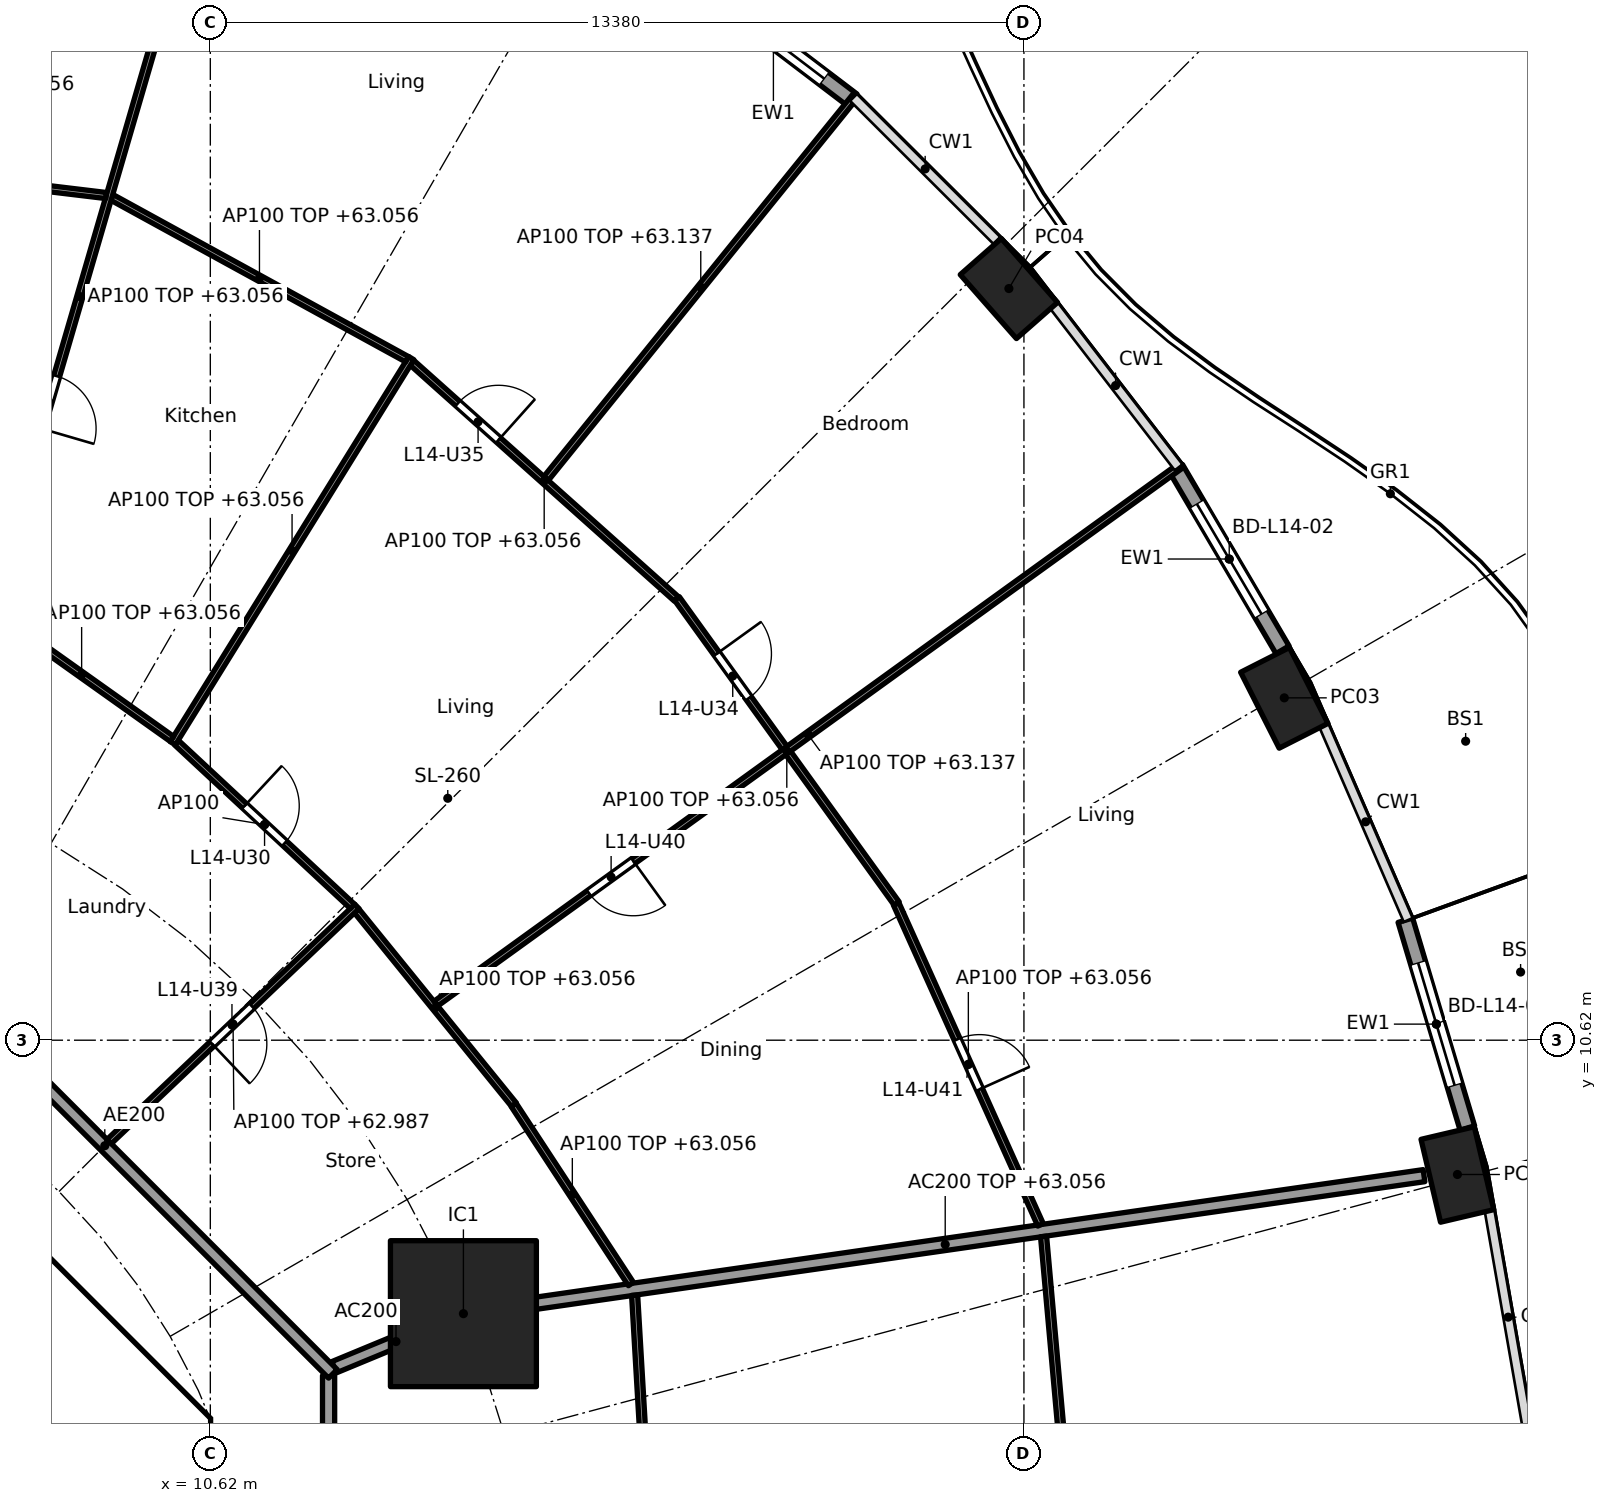
"""IFC4 building model, lengths in metres.
Left out: names, types, materials, properties, quantities, classifications, styles, units other than length and angle.
Written with IfcOpenShell. Run it as: python <this file> out.ifc"""

import sys

from ifc_helpers import new_model, si_unit, direction, frame, frame_2d, origin, origin_2d, place, context, subcontext, project, spatial, polyline, rectangle, hollow_rectangle, outline, extrude, element, fill, save


model = new_model("IFC4")
c1 = context("Model", 3, precision=1e-05, world=origin(), true_north=direction((0.0, 1.0)))
c2 = subcontext(c1, "Body", "Model", "MODEL_VIEW")
j1 = project(units=[si_unit("LENGTHUNIT", "METRE"), si_unit("PLANEANGLEUNIT", "RADIAN")], contexts=[c1])
p1 = place(None, origin())
s1 = spatial("IfcSite", under=j1, at=p1, CompositionType="ELEMENT")
p2 = place(p1, origin())
s2 = spatial("IfcBuilding", under=s1, at=p2, CompositionType="ELEMENT")
p3 = place(p2, frame((0.0, 0.0, 60.3)))
s3 = spatial("IfcBuildingStorey", under=s2, at=p3, CompositionType="ELEMENT", Elevation=60.3)
for number, where, z_axis, x_axis in (
    (1, (31.129, 8.412, 0.0), (0.0, 0.0, 1.0), (-0.229, 0.973, 0.0)),
    (2, (28.282, 16.25, 0.0), (0.0, 0.0, 1.0), (-0.452, 0.892, 0.0)),
    (3, (23.752, 22.981, 0.0), (0.0, 0.0, 1.0), (-0.66, 0.751, 0.0)),
):
    element("IfcColumn", number, at=place(p3, frame(where, z_axis=z_axis, x_axis=x_axis)), inside=s3, PredefinedType="COLUMN", context=c2, shape_type="SweptSolid", body=[
        extrude(hollow_rectangle(XDim=1.4, YDim=0.9, WallThickness=0.05, at=origin_2d()), origin(), (0.0, 0.0, 1.0), 3.7),
    ])
p4 = place(p3, frame((14.782, 6.123, 0.0), z_axis=(0.0, 0.0, 1.0), x_axis=(1.0, 0.0, 0.0)))
e4 = element("IfcColumn", 4, at=p4, inside=s3, PredefinedType="COLUMN", context=c2, shape_type="SweptSolid", body=[
    extrude(rectangle(XDim=2.4, YDim=2.4, at=origin_2d()), origin(), (0.0, 0.0, 1.0), 3.7),
])
p5 = place(p3, frame((30.273, 12.593, 0.0), z_axis=(0.0, 0.0, 1.0), x_axis=(0.285871309426, -0.958268018065, 0.0)))
e5 = element("IfcWall", 5, at=p5, inside=s3, PredefinedType="SOLIDWALL", context=c2, shape_type="SweptSolid", body=[
    extrude(rectangle(XDim=3.565, YDim=0.25, at=frame_2d((1.783, 0.0))), origin(), (0.0, 0.0, 1.0), 3.44),
])
p6 = place(p5, frame((0.733, 0.0, 0.0)))
e6 = element("IfcOpeningElement", 6, at=p6, cuts=e5, PredefinedType="OPENING", context=c2, shape_type="SweptSolid", body=[
    extrude(rectangle(XDim=2.1, YDim=2.4, at=frame_2d((1.05, 1.2))), frame((0.0, 0.135, 0.0), z_axis=(0.0, -1.0, 0.0), x_axis=(1.0, 0.0, 0.0)), (0.0, 0.0, 1.0), 0.27),
])
p7 = place(p3, frame((26.5, 20.026, 0.0), z_axis=(0.0, 0.0, 1.0), x_axis=(0.506311160839, -0.862350861546, 0.0)))
e7 = element("IfcWall", 7, at=p7, inside=s3, PredefinedType="SOLIDWALL", context=c2, shape_type="SweptSolid", body=[
    extrude(rectangle(XDim=3.462, YDim=0.25, at=frame_2d((1.731, 0.0))), origin(), (0.0, 0.0, 1.0), 3.44),
])
p8 = place(p7, frame((0.681, 0.0, 0.0)))
e8 = element("IfcOpeningElement", 8, at=p8, cuts=e7, PredefinedType="OPENING", context=c2, shape_type="SweptSolid", body=[
    extrude(rectangle(XDim=2.1, YDim=2.4, at=frame_2d((1.05, 1.2))), frame((0.0, 0.135, 0.0), z_axis=(0.0, -1.0, 0.0), x_axis=(1.0, 0.0, 0.0)), (0.0, 0.0, 1.0), 0.27),
])
p9 = place(p3, frame((18.582, 28.056, 0.0), z_axis=(0.0, 0.0, 1.0), x_axis=(0.796022293214, -0.605267303517, 0.0)))
e9 = element("IfcWall", 9, at=p9, inside=s3, PredefinedType="SOLIDWALL", context=c2, shape_type="SweptSolid", body=[
    extrude(rectangle(XDim=3.262, YDim=0.25, at=frame_2d((1.631, 0.0))), origin(), (0.0, 0.0, 1.0), 3.44),
])
p10 = place(p9, frame((0.581, 0.0, 0.0)))
e10 = element("IfcOpeningElement", 10, at=p10, cuts=e9, PredefinedType="OPENING", context=c2, shape_type="SweptSolid", body=[
    extrude(rectangle(XDim=2.1, YDim=2.4, at=frame_2d((1.05, 1.2))), frame((0.0, 0.135, 0.0), z_axis=(0.0, -1.0, 0.0), x_axis=(1.0, 0.0, 0.0)), (0.0, 0.0, 1.0), 0.27),
])
p11 = place(p3, frame((9.988, 4.613, 0.0), z_axis=(0.0, 0.0, 1.0), x_axis=(-0.707106781187, 0.707106781187, 0.0)))
e11 = element("IfcWall", 11, at=p11, inside=s3, PredefinedType="SHEAR", context=c2, shape_type="SweptSolid", body=[
    extrude(rectangle(XDim=7.602, YDim=0.6, at=frame_2d((3.801, 0.0))), origin(), (0.0, 0.0, 1.0), 3.44),
])
p12 = place(p11, frame((3.201, 0.0, 0.0)))
e12 = element("IfcOpeningElement", 12, at=p12, cuts=e11, PredefinedType="OPENING", context=c2, shape_type="SweptSolid", body=[
    extrude(rectangle(XDim=1.2, YDim=2.1, at=frame_2d((0.6, 1.05))), frame((0.0, 0.31, 0.0), z_axis=(0.0, -1.0, 0.0), x_axis=(1.0, 0.0, 0.0)), (0.0, 0.0, 1.0), 0.62),
])
p13 = place(p3, origin())
e13 = element("IfcWall", 13, at=p13, inside=s3, PredefinedType="SHEAR", context=c2, shape_type="SweptSolid", body=[
    extrude(outline(polyline([(9.776, -4.401), (10.025, -4.152), (10.025, -3.801), (10.025, 4.152), (9.776, 4.401), (10.2, 4.825), (10.625, 4.401), (10.625, -4.401), (10.2, -4.825), (9.776, -4.401)])), origin(), (0.0, 0.0, 1.0), 3.44),
])
p14 = place(p3, frame((12.657, 5.243, 0.0), z_axis=(0.0, 0.0, 1.0), x_axis=(0.923853160736, 0.382747093259, 0.0)))
e14 = element("IfcWall", 14, at=p14, inside=s3, PredefinedType="PARTITIONING", context=c2, shape_type="SweptSolid", body=[
    extrude(rectangle(XDim=2.2, YDim=0.2, at=frame_2d((1.1, 0.0))), origin(), (0.0, 0.0, 1.0), 3.44),
])
p15 = place(p3, frame((14.832, 6.13, 0.0), z_axis=(0.0, 0.0, 1.0), x_axis=(0.989836541293, 0.142209779978, 0.0)))
e15 = element("IfcWall", 15, at=p15, inside=s3, PredefinedType="PARTITIONING", context=c2, shape_type="SweptSolid", body=[
    extrude(rectangle(XDim=15.909, YDim=0.2, at=frame_2d((7.955, 0.0))), origin(), (0.0, 0.0, 1.0), 2.756),
])
p16 = place(p3, frame((12.565, -5.104, 0.0), z_axis=(0.0, 0.0, 1.0), x_axis=(0.0, 1.0, 0.0)))
e16 = element("IfcWall", 16, at=p16, inside=s3, PredefinedType="PARTITIONING", context=c2, shape_type="SweptSolid", body=[
    extrude(rectangle(XDim=10.209, YDim=0.2, at=frame_2d((5.104, 0.0))), origin(), (0.0, 0.0, 1.0), 3.44),
])
p17 = place(p3, frame((12.635, 5.134, 0.0), z_axis=(0.0, 0.0, 1.0), x_axis=(-0.707106781187, 0.707106781187, 0.0)))
e17 = element("IfcWall", 17, at=p17, inside=s3, PredefinedType="PARTITIONING", context=c2, shape_type="SweptSolid", body=[
    extrude(rectangle(XDim=10.609, YDim=0.2, at=frame_2d((5.305, 0.0))), origin(), (0.0, 0.0, 1.0), 3.44),
])
p18 = place(p3, frame((17.971, 0.05, 0.0), z_axis=(0.0, 0.0, 1.0), x_axis=(-0.058513659907, 0.998286607946, 0.0)))
e18 = element("IfcWall", 18, at=p18, inside=s3, PredefinedType="PARTITIONING", context=c2, shape_type="SweptSolid", body=[
    extrude(rectangle(XDim=6.388, YDim=0.1, at=frame_2d((3.194, 0.0))), origin(), (0.0, 0.0, 1.0), 2.756),
])
p19 = place(p3, frame((24.982, 0.05, 0.0), z_axis=(0.0, 0.0, 1.0), x_axis=(-0.08944290521, 0.995991951126, 0.0)))
e19 = element("IfcWall", 19, at=p19, inside=s3, PredefinedType="PARTITIONING", context=c2, shape_type="SweptSolid", body=[
    extrude(rectangle(XDim=7.373, YDim=0.1, at=frame_2d((3.686, 0.0))), origin(), (0.0, 0.0, 1.0), 2.756),
])
p20 = place(p3, frame((17.537, 6.61, 0.0), z_axis=(0.0, 0.0, 1.0), x_axis=(-0.547637987196, 0.836715384692, 0.0)))
e20 = element("IfcWall", 20, at=p20, inside=s3, PredefinedType="PARTITIONING", context=c2, shape_type="SweptSolid", body=[
    extrude(rectangle(XDim=3.52, YDim=0.1, at=frame_2d((1.76, 0.0))), origin(), (0.0, 0.0, 1.0), 2.756),
])
p21 = place(p3, frame((24.273, 7.584, 0.0), z_axis=(0.0, 0.0, 1.0), x_axis=(-0.410201529109, 0.911994904326, 0.0)))
e21 = element("IfcWall", 21, at=p21, inside=s3, PredefinedType="PARTITIONING", context=c2, shape_type="SweptSolid", body=[
    extrude(rectangle(XDim=5.787, YDim=0.1, at=frame_2d((2.894, 0.0))), origin(), (0.0, 0.0, 1.0), 2.756),
])
p22 = place(p21, frame((2.444, 0.0, 0.0)))
e22 = element("IfcOpeningElement", 22, at=p22, cuts=e21, PredefinedType="OPENING", context=c2, shape_type="SweptSolid", body=[
    extrude(rectangle(XDim=0.9, YDim=2.1, at=frame_2d((0.45, 1.05))), frame((0.0, 0.06, 0.0), z_axis=(0.0, -1.0, 0.0), x_axis=(1.0, 0.0, 0.0)), (0.0, 0.0, 1.0), 0.12),
])
p23 = place(p3, frame((15.614, 9.559, 0.0), z_axis=(0.0, 0.0, 1.0), x_axis=(-0.63012473344, 0.776493928056, 0.0)))
e23 = element("IfcWall", 23, at=p23, inside=s3, PredefinedType="PARTITIONING", context=c2, shape_type="SweptSolid", body=[
    extrude(rectangle(XDim=4.106, YDim=0.1, at=frame_2d((2.053, 0.0))), origin(), (0.0, 0.0, 1.0), 2.756),
])
p24 = place(p3, frame((21.908, 12.866, 0.0), z_axis=(0.0, 0.0, 1.0), x_axis=(-0.584553256988, 0.811355341231, 0.0)))
e24 = element("IfcWall", 24, at=p24, inside=s3, PredefinedType="PARTITIONING", context=c2, shape_type="SweptSolid", body=[
    extrude(rectangle(XDim=6.184, YDim=0.1, at=frame_2d((3.092, 0.0))), origin(), (0.0, 0.0, 1.0), 2.756),
])
p25 = place(p24, frame((4.163, 0.0, 0.0)))
e25 = element("IfcOpeningElement", 25, at=p25, cuts=e24, PredefinedType="OPENING", context=c2, shape_type="SweptSolid", body=[
    extrude(rectangle(XDim=0.9, YDim=2.1, at=frame_2d((0.45, 1.05))), frame((0.0, 0.06, 0.0), z_axis=(0.0, -1.0, 0.0), x_axis=(1.0, 0.0, 0.0)), (0.0, 0.0, 1.0), 0.12),
])
p26 = place(p3, frame((14.329, 11.221, 0.0), z_axis=(0.0, 0.0, 1.0), x_axis=(0.810671130917, 0.58550176558, 0.0)))
e26 = element("IfcWall", 26, at=p26, inside=s3, PredefinedType="PARTITIONING", context=c2, shape_type="SweptSolid", body=[
    extrude(rectangle(XDim=15.106, YDim=0.1, at=frame_2d((7.553, 0.0))), origin(), (0.0, 0.0, 1.0), 2.837),
])
p27 = place(p26, frame((3.105, 0.0, 0.0)))
e27 = element("IfcOpeningElement", 27, at=p27, cuts=e26, PredefinedType="OPENING", context=c2, shape_type="SweptSolid", body=[
    extrude(rectangle(XDim=0.9, YDim=2.1, at=frame_2d((0.45, 1.05))), frame((0.0, 0.06, 0.0), z_axis=(0.0, -1.0, 0.0), x_axis=(1.0, 0.0, 0.0)), (0.0, 0.0, 1.0), 0.12),
])
p28 = place(p3, frame((8.957, 8.953, 0.0), z_axis=(0.0, 0.0, 1.0), x_axis=(0.725253319157, 0.688482115273, 0.0)))
e28 = element("IfcWall", 28, at=p28, inside=s3, PredefinedType="PARTITIONING", context=c2, shape_type="SweptSolid", body=[
    extrude(rectangle(XDim=5.617, YDim=0.1, at=frame_2d((2.809, 0.0))), origin(), (0.0, 0.0, 1.0), 2.687),
])
p29 = place(p28, frame((2.333, 0.0, 0.0)))
e29 = element("IfcOpeningElement", 29, at=p29, cuts=e28, PredefinedType="OPENING", context=c2, shape_type="SweptSolid", body=[
    extrude(rectangle(XDim=0.9, YDim=2.1, at=frame_2d((0.45, 1.05))), frame((0.0, 0.06, 0.0), z_axis=(0.0, -1.0, 0.0), x_axis=(1.0, 0.0, 0.0)), (0.0, 0.0, 1.0), 0.12),
])
p30 = place(p3, frame((12.958, 12.82, 0.0), z_axis=(0.0, 0.0, 1.0), x_axis=(-0.732022571638, 0.681280378855, 0.0)))
e30 = element("IfcWall", 30, at=p30, inside=s3, PredefinedType="PARTITIONING", context=c2, shape_type="SweptSolid", body=[
    extrude(rectangle(XDim=3.95, YDim=0.1, at=frame_2d((1.975, 0.0))), origin(), (0.0, 0.0, 1.0), 3.44),
])
p31 = place(p30, frame((1.525, 0.0, 0.0)))
e31 = element("IfcOpeningElement", 31, at=p31, cuts=e30, PredefinedType="OPENING", context=c2, shape_type="SweptSolid", body=[
    extrude(rectangle(XDim=0.9, YDim=2.1, at=frame_2d((0.45, 1.05))), frame((0.0, 0.06, 0.0), z_axis=(0.0, -1.0, 0.0), x_axis=(1.0, 0.0, 0.0)), (0.0, 0.0, 1.0), 0.12),
])
p32 = place(p3, frame((18.285, 17.877, 0.0), z_axis=(0.0, 0.0, 1.0), x_axis=(-0.745806142791, 0.666163041136, 0.0)))
e32 = element("IfcWall", 32, at=p32, inside=s3, PredefinedType="PARTITIONING", context=c2, shape_type="SweptSolid", body=[
    extrude(rectangle(XDim=5.831, YDim=0.1, at=frame_2d((2.915, 0.0))), origin(), (0.0, 0.0, 1.0), 2.756),
])
p33 = place(p32, frame((3.923, 0.0, 0.0)))
e33 = element("IfcOpeningElement", 33, at=p33, cuts=e32, PredefinedType="OPENING", context=c2, shape_type="SweptSolid", body=[
    extrude(rectangle(XDim=0.9, YDim=2.1, at=frame_2d((0.45, 1.05))), frame((0.0, 0.06, 0.0), z_axis=(0.0, -1.0, 0.0), x_axis=(1.0, 0.0, 0.0)), (0.0, 0.0, 1.0), 0.12),
])
p34 = place(p3, frame((16.142, 19.858, 0.0), z_axis=(0.0, 0.0, 1.0), x_axis=(0.628738066508, 0.777617157555, 0.0)))
e34 = element("IfcWall", 34, at=p34, inside=s3, PredefinedType="PARTITIONING", context=c2, shape_type="SweptSolid", body=[
    extrude(rectangle(XDim=8.091, YDim=0.1, at=frame_2d((4.045, 0.0))), origin(), (0.0, 0.0, 1.0), 2.837),
])
p35 = place(p3, frame((10.003, 15.503, 0.0), z_axis=(0.0, 0.0, 1.0), x_axis=(0.52645953022, 0.850200189979, 0.0)))
e35 = element("IfcWall", 35, at=p35, inside=s3, PredefinedType="PARTITIONING", context=c2, shape_type="SweptSolid", body=[
    extrude(rectangle(XDim=7.45, YDim=0.1, at=frame_2d((3.725, 0.0))), origin(), (0.0, 0.0, 1.0), 2.756),
])
p36 = place(p3, frame((9.989, 15.574, 0.0), z_axis=(0.0, 0.0, 1.0), x_axis=(-0.81494477814, 0.57953861699, 0.0)))
e36 = element("IfcWall", 36, at=p36, inside=s3, PredefinedType="PARTITIONING", context=c2, shape_type="SweptSolid", body=[
    extrude(rectangle(XDim=3.644, YDim=0.1, at=frame_2d((1.822, 0.0))), origin(), (0.0, 0.0, 1.0), 2.756),
])
p37 = place(p3, frame((13.855, 21.818, 0.0), z_axis=(0.0, 0.0, 1.0), x_axis=(-0.876794415294, 0.480865421203, 0.0)))
e37 = element("IfcWall", 37, at=p37, inside=s3, PredefinedType="PARTITIONING", context=c2, shape_type="SweptSolid", body=[
    extrude(rectangle(XDim=5.536, YDim=0.1, at=frame_2d((2.768, 0.0))), origin(), (0.0, 0.0, 1.0), 2.756),
])
p38 = place(p3, frame((6.137, 14.83, 0.0), z_axis=(0.0, 0.0, 1.0), x_axis=(0.27985745069, 0.960041565399, 0.0)))
e38 = element("IfcWall", 38, at=p38, inside=s3, PredefinedType="PARTITIONING", context=c2, shape_type="SweptSolid", body=[
    extrude(rectangle(XDim=16.705, YDim=0.1, at=frame_2d((8.353, 0.0))), origin(), (0.0, 0.0, 1.0), 2.756),
])
p39 = place(p38, frame((1.334, 0.0, 0.0)))
e39 = element("IfcOpeningElement", 39, at=p39, cuts=e38, PredefinedType="OPENING", context=c2, shape_type="SweptSolid", body=[
    extrude(rectangle(XDim=0.9, YDim=2.1, at=frame_2d((0.45, 1.05))), frame((0.0, 0.06, 0.0), z_axis=(0.0, -1.0, 0.0), x_axis=(1.0, 0.0, 0.0)), (0.0, 0.0, 1.0), 0.12),
])
p40 = place(p38, frame((6.091, 0.0, 0.0)))
e40 = element("IfcOpeningElement", 40, at=p40, cuts=e38, PredefinedType="OPENING", context=c2, shape_type="SweptSolid", body=[
    extrude(rectangle(XDim=0.9, YDim=2.1, at=frame_2d((0.45, 1.05))), frame((0.0, 0.06, 0.0), z_axis=(0.0, -1.0, 0.0), x_axis=(1.0, 0.0, 0.0)), (0.0, 0.0, 1.0), 0.12),
])
p41 = place(p3, frame((8.907, 24.51, 0.0), z_axis=(0.0, 0.0, 1.0), x_axis=(-0.992836798252, 0.119478416615, 0.0)))
e41 = element("IfcWall", 41, at=p41, inside=s3, PredefinedType="PARTITIONING", context=c2, shape_type="SweptSolid", body=[
    extrude(rectangle(XDim=6.01, YDim=0.1, at=frame_2d((3.005, 0.0))), origin(), (0.0, 0.0, 1.0), 2.756),
])
p42 = place(p41, frame((2.555, 0.0, 0.0)))
e42 = element("IfcOpeningElement", 42, at=p42, cuts=e41, PredefinedType="OPENING", context=c2, shape_type="SweptSolid", body=[
    extrude(rectangle(XDim=0.9, YDim=2.1, at=frame_2d((0.45, 1.05))), frame((0.0, 0.06, 0.0), z_axis=(0.0, -1.0, 0.0), x_axis=(1.0, 0.0, 0.0)), (0.0, 0.0, 1.0), 0.12),
])
p43 = place(p6, origin())
e43 = element("IfcDoor", 43, at=p43, inside=s3, OperationType="SLIDING_TO_LEFT", PredefinedType="DOOR", context=c2, shape_type="SweptSolid", body=[
    extrude(rectangle(XDim=2.1, YDim=2.4, at=frame_2d((1.05, 1.2))), frame((0.0, 0.025, 0.0), z_axis=(0.0, -1.0, 0.0), x_axis=(1.0, 0.0, 0.0)), (0.0, 0.0, 1.0), 0.05),
])
fill(e6, e43)
p44 = place(p8, origin())
e44 = element("IfcDoor", 44, at=p44, inside=s3, OperationType="SLIDING_TO_LEFT", PredefinedType="DOOR", context=c2, shape_type="SweptSolid", body=[
    extrude(rectangle(XDim=2.1, YDim=2.4, at=frame_2d((1.05, 1.2))), frame((0.0, 0.025, 0.0), z_axis=(0.0, -1.0, 0.0), x_axis=(1.0, 0.0, 0.0)), (0.0, 0.0, 1.0), 0.05),
])
fill(e8, e44)
p45 = place(p10, origin())
e45 = element("IfcDoor", 45, at=p45, inside=s3, OperationType="SLIDING_TO_LEFT", PredefinedType="DOOR", context=c2, shape_type="SweptSolid", body=[
    extrude(rectangle(XDim=2.1, YDim=2.4, at=frame_2d((1.05, 1.2))), frame((0.0, 0.025, 0.0), z_axis=(0.0, -1.0, 0.0), x_axis=(1.0, 0.0, 0.0)), (0.0, 0.0, 1.0), 0.05),
])
fill(e10, e45)
p46 = place(p31, frame((0.9, 0.0, 0.0), x_axis=(-1.0, 0.0, 0.0)))
e46 = element("IfcDoor", 46, at=p46, inside=s3, OperationType="SINGLE_SWING_LEFT", PredefinedType="DOOR", context=c2, shape_type="SweptSolid", body=[
    extrude(rectangle(XDim=0.9, YDim=2.1, at=frame_2d((0.45, 1.05))), frame((0.0, 0.025, 0.0), z_axis=(0.0, -1.0, 0.0), x_axis=(1.0, 0.0, 0.0)), (0.0, 0.0, 1.0), 0.05),
])
fill(e31, e46)
p47 = place(p40, frame((0.9, 0.0, 0.0), x_axis=(-1.0, 0.0, 0.0)))
e47 = element("IfcDoor", 47, at=p47, inside=s3, OperationType="SINGLE_SWING_RIGHT", PredefinedType="DOOR", context=c2, shape_type="SweptSolid", body=[
    extrude(rectangle(XDim=0.9, YDim=2.1, at=frame_2d((0.45, 1.05))), frame((0.0, 0.025, 0.0), z_axis=(0.0, -1.0, 0.0), x_axis=(1.0, 0.0, 0.0)), (0.0, 0.0, 1.0), 0.05),
])
fill(e40, e47)
p48 = place(p25, frame((0.9, 0.0, 0.0), x_axis=(-1.0, 0.0, 0.0)))
e48 = element("IfcDoor", 48, at=p48, inside=s3, OperationType="SINGLE_SWING_LEFT", PredefinedType="DOOR", context=c2, shape_type="SweptSolid", body=[
    extrude(rectangle(XDim=0.9, YDim=2.1, at=frame_2d((0.45, 1.05))), frame((0.0, 0.025, 0.0), z_axis=(0.0, -1.0, 0.0), x_axis=(1.0, 0.0, 0.0)), (0.0, 0.0, 1.0), 0.05),
])
fill(e25, e48)
p49 = place(p33, frame((0.9, 0.0, 0.0), x_axis=(-1.0, 0.0, 0.0)))
e49 = element("IfcDoor", 49, at=p49, inside=s3, OperationType="SINGLE_SWING_RIGHT", PredefinedType="DOOR", context=c2, shape_type="SweptSolid", body=[
    extrude(rectangle(XDim=0.9, YDim=2.1, at=frame_2d((0.45, 1.05))), frame((0.0, 0.025, 0.0), z_axis=(0.0, -1.0, 0.0), x_axis=(1.0, 0.0, 0.0)), (0.0, 0.0, 1.0), 0.05),
])
fill(e33, e49)
p50 = place(p29, frame((0.9, 0.0, 0.0), x_axis=(-1.0, 0.0, 0.0)))
e50 = element("IfcDoor", 50, at=p50, inside=s3, OperationType="SINGLE_SWING_RIGHT", PredefinedType="DOOR", context=c2, shape_type="SweptSolid", body=[
    extrude(rectangle(XDim=0.9, YDim=2.1, at=frame_2d((0.45, 1.05))), frame((0.0, 0.025, 0.0), z_axis=(0.0, -1.0, 0.0), x_axis=(1.0, 0.0, 0.0)), (0.0, 0.0, 1.0), 0.05),
])
fill(e29, e50)
p51 = place(p27, frame((0.9, 0.0, 0.0), x_axis=(-1.0, 0.0, 0.0)))
e51 = element("IfcDoor", 51, at=p51, inside=s3, OperationType="SINGLE_SWING_LEFT", PredefinedType="DOOR", context=c2, shape_type="SweptSolid", body=[
    extrude(rectangle(XDim=0.9, YDim=2.1, at=frame_2d((0.45, 1.05))), frame((0.0, 0.025, 0.0), z_axis=(0.0, -1.0, 0.0), x_axis=(1.0, 0.0, 0.0)), (0.0, 0.0, 1.0), 0.05),
])
fill(e27, e51)
p52 = place(p22, frame((0.9, 0.0, 0.0), x_axis=(-1.0, 0.0, 0.0)))
e52 = element("IfcDoor", 52, at=p52, inside=s3, OperationType="SINGLE_SWING_RIGHT", PredefinedType="DOOR", context=c2, shape_type="SweptSolid", body=[
    extrude(rectangle(XDim=0.9, YDim=2.1, at=frame_2d((0.45, 1.05))), frame((0.0, 0.025, 0.0), z_axis=(0.0, -1.0, 0.0), x_axis=(1.0, 0.0, 0.0)), (0.0, 0.0, 1.0), 0.05),
])
fill(e22, e52)
save(model, sys.argv[1])
